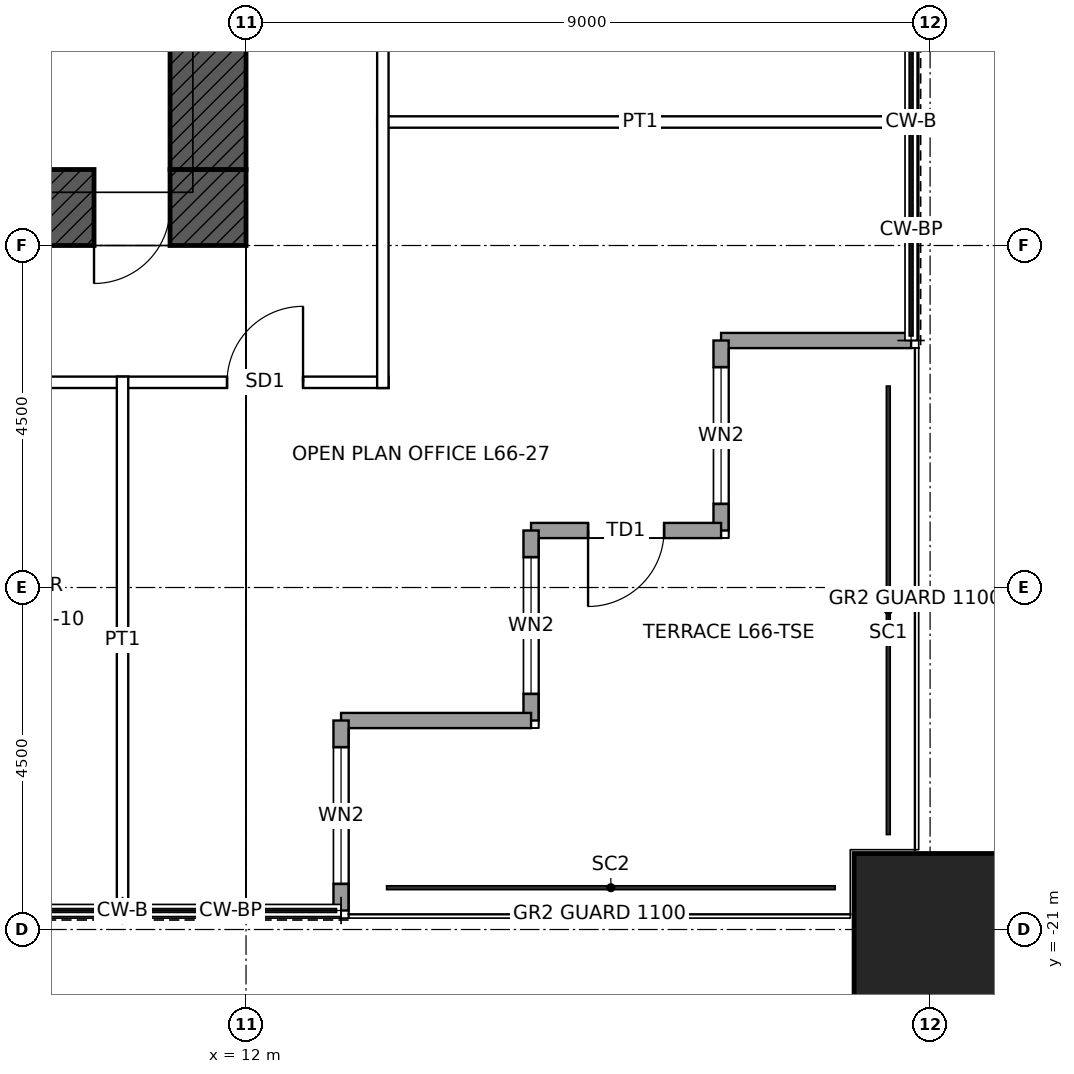
"""IFC4 building model, lengths in metres.
Left out: names, types, materials, properties, quantities, classifications, styles, units other than length and angle.
Written with IfcOpenShell. Run it as: python <this file> out.ifc"""

import sys

from ifc_helpers import new_model, si_unit, direction, frame, frame_2d, origin, origin_2d, place, context, subcontext, project, spatial, rectangle, hollow_rectangle, extrude, element, fill, save


model = new_model("IFC4")
c1 = context("Model", 3, precision=1e-05, world=origin(), true_north=direction((0.0, 1.0)))
c2 = subcontext(c1, "Body", "Model", "MODEL_VIEW")
j1 = project(units=[si_unit("LENGTHUNIT", "METRE"), si_unit("PLANEANGLEUNIT", "RADIAN")], contexts=[c1])
p1 = place(None, origin())
s1 = spatial("IfcSite", under=j1, at=p1, CompositionType="ELEMENT")
p2 = place(p1, origin())
s2 = spatial("IfcBuilding", under=s1, at=p2, CompositionType="ELEMENT")
p3 = place(p2, frame((0.0, 0.0, 299.9)))
s3 = spatial("IfcBuildingStorey", under=s2, at=p3, CompositionType="ELEMENT", Elevation=299.9)
p4 = place(p3, frame((21.0, -21.0, 0.0), z_axis=(0.0, 0.0, 1.0), x_axis=(1.0, 0.0, 0.0)))
e1 = element("IfcColumn", 1, at=p4, inside=s3, PredefinedType="COLUMN", context=c2, shape_type="SweptSolid", body=[
    extrude(hollow_rectangle(XDim=2.0, YDim=2.0, WallThickness=0.095, at=origin_2d()), origin(), (0.0, 0.0, 1.0), 4.0),
])
p5 = place(p3, frame((12.0, -11.5, 0.0), z_axis=(0.0, 0.0, 1.0), x_axis=(-1.0, 0.0, 0.0)))
e2 = element("IfcWall", 2, at=p5, inside=s3, PredefinedType="SHEAR", context=c2, shape_type="SweptSolid", body=[
    extrude(rectangle(XDim=24.0, YDim=1.0, at=frame_2d((12.0, 0.0))), origin(), (0.0, 0.0, 1.0), 4.0),
])
p6 = place(p5, frame((11.5, 0.0, 0.0)))
e3 = element("IfcOpeningElement", 3, at=p6, cuts=e2, PredefinedType="OPENING", context=c2, shape_type="SweptSolid", body=[
    extrude(rectangle(XDim=1.0, YDim=2.1, at=frame_2d((0.5, 1.05))), frame((0.0, 0.51, 0.0), z_axis=(0.0, -1.0, 0.0), x_axis=(1.0, 0.0, 0.0)), (0.0, 0.0, 1.0), 1.02),
])
p7 = place(p5, frame((1.0, 0.0, 0.0)))
e4 = element("IfcOpeningElement", 4, at=p7, cuts=e2, PredefinedType="OPENING", context=c2, shape_type="SweptSolid", body=[
    extrude(rectangle(XDim=1.0, YDim=2.4, at=frame_2d((0.5, 1.2))), frame((0.0, 0.51, 0.0), z_axis=(0.0, -1.0, 0.0), x_axis=(1.0, 0.0, 0.0)), (0.0, 0.0, 1.0), 1.02),
])
p8 = place(p3, frame((11.5, 11.0, 0.0), z_axis=(0.0, 0.0, 1.0), x_axis=(0.0, -1.0, 0.0)))
e5 = element("IfcWall", 5, at=p8, inside=s3, PredefinedType="SHEAR", context=c2, shape_type="SweptSolid", body=[
    extrude(rectangle(XDim=22.0, YDim=1.0, at=frame_2d((11.0, 0.0))), origin(), (0.0, 0.0, 1.0), 4.0),
])
p9 = place(p8, frame((10.5, 0.0, 0.0)))
e6 = element("IfcOpeningElement", 6, at=p9, cuts=e5, PredefinedType="OPENING", context=c2, shape_type="SweptSolid", body=[
    extrude(rectangle(XDim=1.0, YDim=2.4, at=frame_2d((0.5, 1.2))), frame((0.0, 0.51, 0.0), z_axis=(0.0, -1.0, 0.0), x_axis=(1.0, 0.0, 0.0)), (0.0, 0.0, 1.0), 1.02),
])
p10 = place(p3, frame((20.75, -13.25, 0.0), z_axis=(0.0, 0.0, 1.0), x_axis=(-1.0, 0.0, 0.0)))
e7 = element("IfcWall", 7, at=p10, inside=s3, PredefinedType="SOLIDWALL", context=c2, shape_type="SweptSolid", body=[
    extrude(rectangle(XDim=2.5, YDim=0.2, at=frame_2d((1.25, 0.0))), origin(), (0.0, 0.0, 1.0), 3.85),
])
p11 = place(p3, frame((18.25, -13.25, 0.0), z_axis=(0.0, 0.0, 1.0), x_axis=(0.0, -1.0, 0.0)))
e8 = element("IfcWall", 8, at=p11, inside=s3, PredefinedType="SOLIDWALL", context=c2, shape_type="SweptSolid", body=[
    extrude(rectangle(XDim=2.5, YDim=0.2, at=frame_2d((1.25, 0.0))), origin(), (0.0, 0.0, 1.0), 3.85),
])
p12 = place(p11, frame((0.35, 0.0, 0.3)))
e9 = element("IfcOpeningElement", 9, at=p12, cuts=e8, PredefinedType="OPENING", context=c2, shape_type="SweptSolid", body=[
    extrude(rectangle(XDim=1.8, YDim=2.4, at=frame_2d((0.9, 1.2))), frame((0.0, 0.11, 0.0), z_axis=(0.0, -1.0, 0.0), x_axis=(1.0, 0.0, 0.0)), (0.0, 0.0, 1.0), 0.22),
])
p13 = place(p3, frame((18.25, -15.75, 0.0), z_axis=(0.0, 0.0, 1.0), x_axis=(-1.0, 0.0, 0.0)))
e10 = element("IfcWall", 10, at=p13, inside=s3, PredefinedType="SOLIDWALL", context=c2, shape_type="SweptSolid", body=[
    extrude(rectangle(XDim=2.5, YDim=0.2, at=frame_2d((1.25, 0.0))), origin(), (0.0, 0.0, 1.0), 3.317),
])
p14 = place(p13, frame((0.75, 0.0, 0.0)))
e11 = element("IfcOpeningElement", 11, at=p14, cuts=e10, PredefinedType="OPENING", context=c2, shape_type="SweptSolid", body=[
    extrude(rectangle(XDim=1.0, YDim=2.4, at=frame_2d((0.5, 1.2))), frame((0.0, 0.11, 0.0), z_axis=(0.0, -1.0, 0.0), x_axis=(1.0, 0.0, 0.0)), (0.0, 0.0, 1.0), 0.22),
])
p15 = place(p3, frame((15.75, -15.75, 0.0), z_axis=(0.0, 0.0, 1.0), x_axis=(0.0, -1.0, 0.0)))
e12 = element("IfcWall", 12, at=p15, inside=s3, PredefinedType="SOLIDWALL", context=c2, shape_type="SweptSolid", body=[
    extrude(rectangle(XDim=2.5, YDim=0.2, at=frame_2d((1.25, 0.0))), origin(), (0.0, 0.0, 1.0), 3.85),
])
p16 = place(p15, frame((0.35, 0.0, 0.3)))
e13 = element("IfcOpeningElement", 13, at=p16, cuts=e12, PredefinedType="OPENING", context=c2, shape_type="SweptSolid", body=[
    extrude(rectangle(XDim=1.8, YDim=2.4, at=frame_2d((0.9, 1.2))), frame((0.0, 0.11, 0.0), z_axis=(0.0, -1.0, 0.0), x_axis=(1.0, 0.0, 0.0)), (0.0, 0.0, 1.0), 0.22),
])
p17 = place(p3, frame((15.75, -18.25, 0.0), z_axis=(0.0, 0.0, 1.0), x_axis=(-1.0, 0.0, 0.0)))
e14 = element("IfcWall", 14, at=p17, inside=s3, PredefinedType="SOLIDWALL", context=c2, shape_type="SweptSolid", body=[
    extrude(rectangle(XDim=2.5, YDim=0.2, at=frame_2d((1.25, 0.0))), origin(), (0.0, 0.0, 1.0), 3.85),
])
p18 = place(p3, frame((13.25, -18.25, 0.0), z_axis=(0.0, 0.0, 1.0), x_axis=(0.0, -1.0, 0.0)))
e15 = element("IfcWall", 15, at=p18, inside=s3, PredefinedType="SOLIDWALL", context=c2, shape_type="SweptSolid", body=[
    extrude(rectangle(XDim=2.5, YDim=0.2, at=frame_2d((1.25, 0.0))), origin(), (0.0, 0.0, 1.0), 3.85),
])
p19 = place(p18, frame((0.35, 0.0, 0.3)))
e16 = element("IfcOpeningElement", 16, at=p19, cuts=e15, PredefinedType="OPENING", context=c2, shape_type="SweptSolid", body=[
    extrude(rectangle(XDim=1.8, YDim=2.4, at=frame_2d((0.9, 1.2))), frame((0.0, 0.11, 0.0), z_axis=(0.0, -1.0, 0.0), x_axis=(1.0, 0.0, 0.0)), (0.0, 0.0, 1.0), 0.22),
])
p20 = place(p3, frame((-13.875, -13.8, 0.0), z_axis=(0.0, 0.0, 1.0), x_axis=(1.0, 0.0, 0.0)))
e17 = element("IfcWall", 17, at=p20, inside=s3, PredefinedType="PARTITIONING", context=c2, shape_type="SweptSolid", body=[
    extrude(rectangle(XDim=27.75, YDim=0.15, at=frame_2d((13.875, 0.0))), origin(), (0.0, 0.0, 1.0), 3.85),
])
p21 = place(p20, frame((21.775, 0.0, 0.0)))
e18 = element("IfcOpeningElement", 18, at=p21, cuts=e17, PredefinedType="OPENING", context=c2, shape_type="SweptSolid", body=[
    extrude(rectangle(XDim=1.0, YDim=2.1, at=frame_2d((0.5, 1.05))), frame((0.0, 0.085, 0.0), z_axis=(0.0, -1.0, 0.0), x_axis=(1.0, 0.0, 0.0)), (0.0, 0.0, 1.0), 0.17),
])
p22 = place(p20, frame((19.625, 0.0, 0.0)))
e19 = element("IfcOpeningElement", 19, at=p22, cuts=e17, PredefinedType="OPENING", context=c2, shape_type="SweptSolid", body=[
    extrude(rectangle(XDim=1.0, YDim=2.1, at=frame_2d((0.5, 1.05))), frame((0.0, 0.085, 0.0), z_axis=(0.0, -1.0, 0.0), x_axis=(1.0, 0.0, 0.0)), (0.0, 0.0, 1.0), 0.17),
])
p23 = place(p20, frame((17.125, 0.0, 0.0)))
e20 = element("IfcOpeningElement", 20, at=p23, cuts=e17, PredefinedType="OPENING", context=c2, shape_type="SweptSolid", body=[
    extrude(rectangle(XDim=1.0, YDim=2.1, at=frame_2d((0.5, 1.05))), frame((0.0, 0.085, 0.0), z_axis=(0.0, -1.0, 0.0), x_axis=(1.0, 0.0, 0.0)), (0.0, 0.0, 1.0), 0.17),
])
p24 = place(p20, frame((14.975, 0.0, 0.0)))
e21 = element("IfcOpeningElement", 21, at=p24, cuts=e17, PredefinedType="OPENING", context=c2, shape_type="SweptSolid", body=[
    extrude(rectangle(XDim=1.0, YDim=2.1, at=frame_2d((0.5, 1.05))), frame((0.0, 0.085, 0.0), z_axis=(0.0, -1.0, 0.0), x_axis=(1.0, 0.0, 0.0)), (0.0, 0.0, 1.0), 0.17),
])
p25 = place(p20, frame((11.775, 0.0, 0.0)))
e22 = element("IfcOpeningElement", 22, at=p25, cuts=e17, PredefinedType="OPENING", context=c2, shape_type="SweptSolid", body=[
    extrude(rectangle(XDim=1.0, YDim=2.1, at=frame_2d((0.5, 1.05))), frame((0.0, 0.085, 0.0), z_axis=(0.0, -1.0, 0.0), x_axis=(1.0, 0.0, 0.0)), (0.0, 0.0, 1.0), 0.17),
])
p26 = place(p20, frame((9.625, 0.0, 0.0)))
e23 = element("IfcOpeningElement", 23, at=p26, cuts=e17, PredefinedType="OPENING", context=c2, shape_type="SweptSolid", body=[
    extrude(rectangle(XDim=1.0, YDim=2.1, at=frame_2d((0.5, 1.05))), frame((0.0, 0.085, 0.0), z_axis=(0.0, -1.0, 0.0), x_axis=(1.0, 0.0, 0.0)), (0.0, 0.0, 1.0), 0.17),
])
p27 = place(p20, frame((7.125, 0.0, 0.0)))
e24 = element("IfcOpeningElement", 24, at=p27, cuts=e17, PredefinedType="OPENING", context=c2, shape_type="SweptSolid", body=[
    extrude(rectangle(XDim=1.0, YDim=2.1, at=frame_2d((0.5, 1.05))), frame((0.0, 0.085, 0.0), z_axis=(0.0, -1.0, 0.0), x_axis=(1.0, 0.0, 0.0)), (0.0, 0.0, 1.0), 0.17),
])
p28 = place(p20, frame((4.438, 0.0, 0.0)))
e25 = element("IfcOpeningElement", 25, at=p28, cuts=e17, PredefinedType="OPENING", context=c2, shape_type="SweptSolid", body=[
    extrude(rectangle(XDim=1.0, YDim=2.1, at=frame_2d((0.5, 1.05))), frame((0.0, 0.085, 0.0), z_axis=(0.0, -1.0, 0.0), x_axis=(1.0, 0.0, 0.0)), (0.0, 0.0, 1.0), 0.17),
])
p29 = place(p20, frame((25.625, 0.0, 0.0)))
e26 = element("IfcOpeningElement", 26, at=p29, cuts=e17, PredefinedType="OPENING", context=c2, shape_type="SweptSolid", body=[
    extrude(rectangle(XDim=1.0, YDim=2.4, at=frame_2d((0.5, 1.2))), frame((0.0, 0.085, 0.0), z_axis=(0.0, -1.0, 0.0), x_axis=(1.0, 0.0, 0.0)), (0.0, 0.0, 1.0), 0.17),
])
p30 = place(p20, frame((1.288, 0.0, 0.0)))
e27 = element("IfcOpeningElement", 27, at=p30, cuts=e17, PredefinedType="OPENING", context=c2, shape_type="SweptSolid", body=[
    extrude(rectangle(XDim=1.0, YDim=2.4, at=frame_2d((0.5, 1.2))), frame((0.0, 0.085, 0.0), z_axis=(0.0, -1.0, 0.0), x_axis=(1.0, 0.0, 0.0)), (0.0, 0.0, 1.0), 0.17),
])
for number, where, z_axis, x_axis in (
    (28, (13.725, -10.375, 0.0), (0.0, 0.0, 1.0), (1.0, 0.0, 0.0)),
    (29, (10.375, -20.65, 0.0), (0.0, 0.0, 1.0), (0.0, 1.0, 0.0)),
):
    element("IfcWall", number, at=place(p3, frame(where, z_axis=z_axis, x_axis=x_axis)), inside=s3, PredefinedType="PARTITIONING", context=c2, shape_type="SweptSolid", body=[
        extrude(rectangle(XDim=6.925, YDim=0.15, at=frame_2d((3.462, 0.0))), origin(), (0.0, 0.0, 1.0), 3.85),
    ])
p31 = place(p3, frame((13.8, -13.875, 0.0), z_axis=(0.0, 0.0, 1.0), x_axis=(0.0, 1.0, 0.0)))
e30 = element("IfcWall", 30, at=p31, inside=s3, PredefinedType="PARTITIONING", context=c2, shape_type="SweptSolid", body=[
    extrude(rectangle(XDim=13.95, YDim=0.15, at=frame_2d((6.975, 0.0))), origin(), (0.0, 0.0, 1.0), 3.85),
])
p32 = place(p31, frame((11.775, 0.0, 0.0)))
e31 = element("IfcOpeningElement", 31, at=p32, cuts=e30, PredefinedType="OPENING", context=c2, shape_type="SweptSolid", body=[
    extrude(rectangle(XDim=1.0, YDim=2.1, at=frame_2d((0.5, 1.05))), frame((0.0, 0.085, 0.0), z_axis=(0.0, -1.0, 0.0), x_axis=(1.0, 0.0, 0.0)), (0.0, 0.0, 1.0), 0.17),
])
p33 = place(p31, frame((9.625, 0.0, 0.0)))
e32 = element("IfcOpeningElement", 32, at=p33, cuts=e30, PredefinedType="OPENING", context=c2, shape_type="SweptSolid", body=[
    extrude(rectangle(XDim=1.0, YDim=2.1, at=frame_2d((0.5, 1.05))), frame((0.0, 0.085, 0.0), z_axis=(0.0, -1.0, 0.0), x_axis=(1.0, 0.0, 0.0)), (0.0, 0.0, 1.0), 0.17),
])
p34 = place(p31, frame((5.688, 0.0, 0.0)))
e33 = element("IfcOpeningElement", 33, at=p34, cuts=e30, PredefinedType="OPENING", context=c2, shape_type="SweptSolid", body=[
    extrude(rectangle(XDim=1.0, YDim=2.1, at=frame_2d((0.5, 1.05))), frame((0.0, 0.085, 0.0), z_axis=(0.0, -1.0, 0.0), x_axis=(1.0, 0.0, 0.0)), (0.0, 0.0, 1.0), 0.17),
])
p35 = place(p12, origin())
e34 = element("IfcWindow", 34, at=p35, inside=s3, PartitioningType="SINGLE_PANEL", PredefinedType="WINDOW", context=c2, shape_type="SweptSolid", body=[
    extrude(rectangle(XDim=1.8, YDim=2.4, at=frame_2d((0.9, 1.2))), frame((0.0, 0.03, 0.0), z_axis=(0.0, -1.0, 0.0), x_axis=(1.0, 0.0, 0.0)), (0.0, 0.0, 1.0), 0.06),
])
fill(e9, e34)
p36 = place(p14, origin())
e35 = element("IfcDoor", 35, at=p36, inside=s3, OperationType="SINGLE_SWING_RIGHT", PredefinedType="DOOR", context=c2, shape_type="SweptSolid", body=[
    extrude(rectangle(XDim=1.0, YDim=2.4, at=frame_2d((0.5, 1.2))), frame((0.0, 0.025, 0.0), z_axis=(0.0, -1.0, 0.0), x_axis=(1.0, 0.0, 0.0)), (0.0, 0.0, 1.0), 0.05),
])
fill(e11, e35)
p37 = place(p16, origin())
e36 = element("IfcWindow", 36, at=p37, inside=s3, PartitioningType="SINGLE_PANEL", PredefinedType="WINDOW", context=c2, shape_type="SweptSolid", body=[
    extrude(rectangle(XDim=1.8, YDim=2.4, at=frame_2d((0.9, 1.2))), frame((0.0, 0.03, 0.0), z_axis=(0.0, -1.0, 0.0), x_axis=(1.0, 0.0, 0.0)), (0.0, 0.0, 1.0), 0.06),
])
fill(e13, e36)
p38 = place(p19, origin())
e37 = element("IfcWindow", 37, at=p38, inside=s3, PartitioningType="SINGLE_PANEL", PredefinedType="WINDOW", context=c2, shape_type="SweptSolid", body=[
    extrude(rectangle(XDim=1.8, YDim=2.4, at=frame_2d((0.9, 1.2))), frame((0.0, 0.03, 0.0), z_axis=(0.0, -1.0, 0.0), x_axis=(1.0, 0.0, 0.0)), (0.0, 0.0, 1.0), 0.06),
])
fill(e16, e37)
p39 = place(p7, origin())
e38 = element("IfcDoor", 38, at=p39, inside=s3, OperationType="SINGLE_SWING_RIGHT", PredefinedType="DOOR", context=c2, shape_type="SweptSolid", body=[
    extrude(rectangle(XDim=1.0, YDim=2.4, at=frame_2d((0.5, 1.2))), frame((0.0, 0.485, 0.0), z_axis=(0.0, -1.0, 0.0), x_axis=(1.0, 0.0, 0.0)), (0.0, 0.0, 1.0), 0.05),
])
fill(e4, e38)
p40 = place(p29, origin())
e39 = element("IfcDoor", 39, at=p40, inside=s3, OperationType="SINGLE_SWING_RIGHT", PredefinedType="DOOR", context=c2, shape_type="SweptSolid", body=[
    extrude(rectangle(XDim=1.0, YDim=2.4, at=frame_2d((0.5, 1.2))), frame((0.0, 0.025, 0.0), z_axis=(0.0, -1.0, 0.0), x_axis=(1.0, 0.0, 0.0)), (0.0, 0.0, 1.0), 0.05),
])
fill(e26, e39)
save(model, sys.argv[1])
